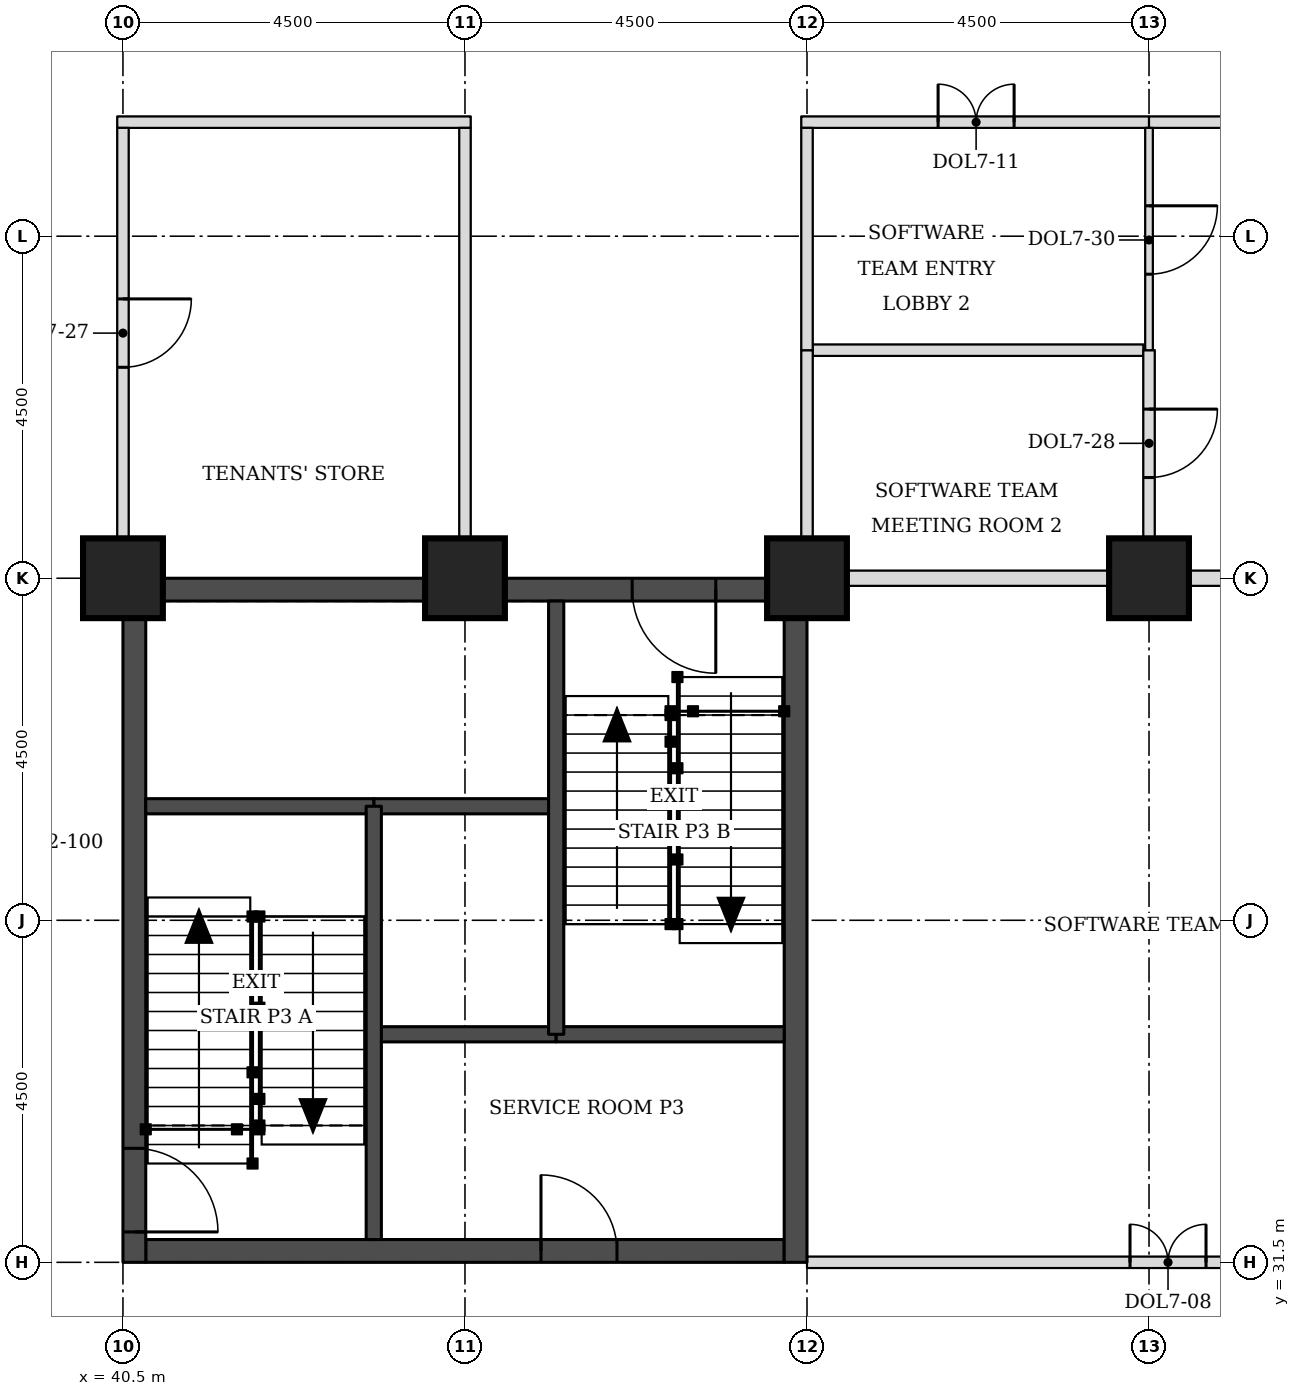
"""IFC4 building model, lengths in metres.
Left out: names, types, materials, properties, quantities, classifications, styles, units other than length and angle.
Written with IfcOpenShell. Run it as: python <this file> out.ifc"""

import sys

from ifc_helpers import new_model, si_unit, direction, frame, frame_2d, origin, origin_2d, place, context, subcontext, project, spatial, rectangle, extrude, element, fill, save


model = new_model("IFC4")
c1 = context("Model", 3, precision=1e-05, world=origin(), true_north=direction((0.0, 1.0)))
c2 = subcontext(c1, "Body", "Model", "MODEL_VIEW")
j1 = project(units=[si_unit("LENGTHUNIT", "METRE"), si_unit("PLANEANGLEUNIT", "RADIAN")], contexts=[c1])
p1 = place(None, origin())
s1 = spatial("IfcSite", under=j1, at=p1, CompositionType="ELEMENT")
p2 = place(p1, origin())
s2 = spatial("IfcBuilding", under=s1, at=p2, CompositionType="ELEMENT")
p3 = place(p2, frame((0.0, 0.0, 134.4)))
s3 = spatial("IfcBuildingStorey", under=s2, at=p3, CompositionType="ELEMENT", Elevation=134.4)
for number, where, z_axis, x_axis in (
    (1, (40.5, 40.5, 0.0), (0.0, 0.0, 1.0), (1.0, 0.0, 0.0)),
    (2, (45.0, 40.5, 0.0), (0.0, 0.0, 1.0), (1.0, 0.0, 0.0)),
    (3, (49.5, 40.5, 0.0), (0.0, 0.0, 1.0), (1.0, 0.0, 0.0)),
    (4, (54.0, 40.5, 0.0), (0.0, 0.0, 1.0), (1.0, 0.0, 0.0)),
):
    element("IfcColumn", number, at=place(p3, frame(where, z_axis=z_axis, x_axis=x_axis)), inside=s3, PredefinedType="COLUMN", context=c2, shape_type="SweptSolid", body=[
        extrude(rectangle(XDim=1.05, YDim=1.05, at=origin_2d()), origin(), (0.0, 0.0, 1.0), 3.7),
    ])
p4 = place(p3, frame((40.8, 31.65, 0.0), z_axis=(0.0, 0.0, 1.0), x_axis=(1.0, 0.0, 0.0)))
e5 = element("IfcWall", 5, at=p4, inside=s3, PredefinedType="SHEAR", context=c2, shape_type="SweptSolid", body=[
    extrude(rectangle(XDim=8.4, YDim=0.3, at=frame_2d((4.2, 0.0))), origin(), (0.0, 0.0, 1.0), 3.7),
])
p5 = place(p4, frame((5.2, 0.0, 0.0)))
e6 = element("IfcOpeningElement", 6, at=p5, cuts=e5, PredefinedType="OPENING", context=c2, shape_type="SweptSolid", body=[
    extrude(rectangle(XDim=1.0, YDim=2.1, at=frame_2d((0.5, 1.05))), frame((0.0, 0.16, 0.0), z_axis=(0.0, -1.0, 0.0), x_axis=(1.0, 0.0, 0.0)), (0.0, 0.0, 1.0), 0.32),
])
p6 = place(p3, frame((40.8, 40.35, 0.0), z_axis=(0.0, 0.0, 1.0), x_axis=(1.0, 0.0, 0.0)))
e7 = element("IfcWall", 7, at=p6, inside=s3, PredefinedType="SHEAR", context=c2, shape_type="SweptSolid", body=[
    extrude(rectangle(XDim=8.4, YDim=0.3, at=frame_2d((4.2, 0.0))), origin(), (0.0, 0.0, 1.0), 3.7),
])
p7 = place(p6, frame((6.4, 0.0, 0.0)))
e8 = element("IfcOpeningElement", 8, at=p7, cuts=e7, PredefinedType="OPENING", context=c2, shape_type="SweptSolid", body=[
    extrude(rectangle(XDim=1.1, YDim=2.1, at=frame_2d((0.55, 1.05))), frame((0.0, 0.16, 0.0), z_axis=(0.0, -1.0, 0.0), x_axis=(1.0, 0.0, 0.0)), (0.0, 0.0, 1.0), 0.32),
])
p8 = place(p3, frame((40.65, 31.5, 0.0), z_axis=(0.0, 0.0, 1.0), x_axis=(0.0, 1.0, 0.0)))
e9 = element("IfcWall", 9, at=p8, inside=s3, PredefinedType="SHEAR", context=c2, shape_type="SweptSolid", body=[
    extrude(rectangle(XDim=9.0, YDim=0.3, at=frame_2d((4.5, 0.0))), origin(), (0.0, 0.0, 1.0), 3.7),
])
p9 = place(p8, frame((0.4, 0.0, 0.0)))
e10 = element("IfcOpeningElement", 10, at=p9, cuts=e9, PredefinedType="OPENING", context=c2, shape_type="SweptSolid", body=[
    extrude(rectangle(XDim=1.1, YDim=2.1, at=frame_2d((0.55, 1.05))), frame((0.0, 0.16, 0.0), z_axis=(0.0, -1.0, 0.0), x_axis=(1.0, 0.0, 0.0)), (0.0, 0.0, 1.0), 0.32),
])
p10 = place(p3, frame((49.35, 31.5, 0.0), z_axis=(0.0, 0.0, 1.0), x_axis=(0.0, 1.0, 0.0)))
e11 = element("IfcWall", 11, at=p10, inside=s3, PredefinedType="SHEAR", context=c2, shape_type="SweptSolid", body=[
    extrude(rectangle(XDim=9.0, YDim=0.3, at=frame_2d((4.5, 0.0))), origin(), (0.0, 0.0, 1.0), 3.7),
])
p11 = place(p3, frame((49.5, 31.5, 0.0), z_axis=(0.0, 0.0, 1.0), x_axis=(1.0, 0.0, 0.0)))
e12 = element("IfcWall", 12, at=p11, inside=s3, PredefinedType="PARTITIONING", context=c2, shape_type="SweptSolid", body=[
    extrude(rectangle(XDim=9.525, YDim=0.15, at=frame_2d((4.762, 0.0))), origin(), (0.0, 0.0, 1.0), 2.55),
])
p12 = place(p11, frame((4.25, 0.0, 0.0)))
e13 = element("IfcOpeningElement", 13, at=p12, cuts=e12, PredefinedType="OPENING", context=c2, shape_type="SweptSolid", body=[
    extrude(rectangle(XDim=1.0, YDim=2.1, at=frame_2d((0.5, 1.05))), frame((0.0, 0.085, 0.0), z_axis=(0.0, -1.0, 0.0), x_axis=(1.0, 0.0, 0.0)), (0.0, 0.0, 1.0), 0.17),
])
p13 = place(p3, frame((50.015, 40.5, 0.0), z_axis=(0.0, 0.0, 1.0), x_axis=(1.0, 0.0, 0.0)))
e14 = element("IfcWall", 14, at=p13, inside=s3, PredefinedType="PARTITIONING", context=c2, shape_type="SweptSolid", body=[
    extrude(rectangle(XDim=3.46, YDim=0.2, at=frame_2d((1.73, 0.0))), origin(), (0.0, 0.0, 1.0), 2.8),
])
p14 = place(p3, frame((54.495, 40.5, 0.0), z_axis=(0.0, 0.0, 1.0), x_axis=(1.0, 0.0, 0.0)))
e15 = element("IfcWall", 15, at=p14, inside=s3, PredefinedType="PARTITIONING", context=c2, shape_type="SweptSolid", body=[
    extrude(rectangle(XDim=3.48, YDim=0.2, at=frame_2d((1.74, 0.0))), origin(), (0.0, 0.0, 1.0), 2.8),
])
p15 = place(p3, frame((49.575, 43.5, 0.0), z_axis=(0.0, 0.0, 1.0), x_axis=(1.0, 0.0, 0.0)))
e16 = element("IfcWall", 16, at=p15, inside=s3, PredefinedType="PARTITIONING", context=c2, shape_type="SweptSolid", body=[
    extrude(rectangle(XDim=4.35, YDim=0.15, at=frame_2d((2.175, 0.0))), origin(), (0.0, 0.0, 1.0), 3.55),
])
p16 = place(p3, frame((40.425, 46.5, 0.0), z_axis=(0.0, 0.0, 1.0), x_axis=(1.0, 0.0, 0.0)))
e17 = element("IfcWall", 17, at=p16, inside=s3, PredefinedType="PARTITIONING", context=c2, shape_type="SweptSolid", body=[
    extrude(rectangle(XDim=4.65, YDim=0.15, at=frame_2d((2.325, 0.0))), origin(), (0.0, 0.0, 1.0), 3.55),
])
p17 = place(p3, frame((49.425, 46.5, 0.0), z_axis=(0.0, 0.0, 1.0), x_axis=(1.0, 0.0, 0.0)))
e18 = element("IfcWall", 18, at=p17, inside=s3, PredefinedType="PARTITIONING", context=c2, shape_type="SweptSolid", body=[
    extrude(rectangle(XDim=4.575, YDim=0.15, at=frame_2d((2.288, 0.0))), origin(), (0.0, 0.0, 1.0), 3.55),
])
p18 = place(p17, frame((1.8, 0.0, 0.0)))
e19 = element("IfcOpeningElement", 19, at=p18, cuts=e18, PredefinedType="OPENING", context=c2, shape_type="SweptSolid", body=[
    extrude(rectangle(XDim=1.0, YDim=2.1, at=frame_2d((0.5, 1.05))), frame((0.0, 0.085, 0.0), z_axis=(0.0, -1.0, 0.0), x_axis=(1.0, 0.0, 0.0)), (0.0, 0.0, 1.0), 0.17),
])
p19 = place(p3, frame((54.0, 46.5, 0.0), z_axis=(0.0, 0.0, 1.0), x_axis=(1.0, 0.0, 0.0)))
e20 = element("IfcWall", 20, at=p19, inside=s3, PredefinedType="PARTITIONING", context=c2, shape_type="SweptSolid", body=[
    extrude(rectangle(XDim=6.0, YDim=0.15, at=frame_2d((3.0, 0.0))), origin(), (0.0, 0.0, 1.0), 3.55),
])
p20 = place(p3, frame((40.5, 41.025, 0.0), z_axis=(0.0, 0.0, 1.0), x_axis=(0.0, 1.0, 0.0)))
e21 = element("IfcWall", 21, at=p20, inside=s3, PredefinedType="PARTITIONING", context=c2, shape_type="SweptSolid", body=[
    extrude(rectangle(XDim=5.4, YDim=0.15, at=frame_2d((2.7, 0.0))), origin(), (0.0, 0.0, 1.0), 3.55),
])
p21 = place(p20, frame((2.25, 0.0, 0.0)))
e22 = element("IfcOpeningElement", 22, at=p21, cuts=e21, PredefinedType="OPENING", context=c2, shape_type="SweptSolid", body=[
    extrude(rectangle(XDim=0.9, YDim=2.1, at=frame_2d((0.45, 1.05))), frame((0.0, 0.085, 0.0), z_axis=(0.0, -1.0, 0.0), x_axis=(1.0, 0.0, 0.0)), (0.0, 0.0, 1.0), 0.17),
])
p22 = place(p3, frame((45.0, 41.025, 0.0), z_axis=(0.0, 0.0, 1.0), x_axis=(0.0, 1.0, 0.0)))
e23 = element("IfcWall", 23, at=p22, inside=s3, PredefinedType="PARTITIONING", context=c2, shape_type="SweptSolid", body=[
    extrude(rectangle(XDim=5.4, YDim=0.15, at=frame_2d((2.7, 0.0))), origin(), (0.0, 0.0, 1.0), 2.938),
])
p23 = place(p3, frame((49.5, 41.025, 0.0), z_axis=(0.0, 0.0, 1.0), x_axis=(0.0, 1.0, 0.0)))
e24 = element("IfcWall", 24, at=p23, inside=s3, PredefinedType="PARTITIONING", context=c2, shape_type="SweptSolid", body=[
    extrude(rectangle(XDim=2.475, YDim=0.15, at=frame_2d((1.238, 0.0))), origin(), (0.0, 0.0, 1.0), 3.55),
])
p24 = place(p3, frame((54.0, 41.025, 0.0), z_axis=(0.0, 0.0, 1.0), x_axis=(0.0, 1.0, 0.0)))
e25 = element("IfcWall", 25, at=p24, inside=s3, PredefinedType="PARTITIONING", context=c2, shape_type="SweptSolid", body=[
    extrude(rectangle(XDim=2.475, YDim=0.15, at=frame_2d((1.238, 0.0))), origin(), (0.0, 0.0, 1.0), 3.55),
])
p25 = place(p24, frame((0.8, 0.0, 0.0)))
e26 = element("IfcOpeningElement", 26, at=p25, cuts=e25, PredefinedType="OPENING", context=c2, shape_type="SweptSolid", body=[
    extrude(rectangle(XDim=0.9, YDim=2.1, at=frame_2d((0.45, 1.05))), frame((0.0, 0.085, 0.0), z_axis=(0.0, -1.0, 0.0), x_axis=(1.0, 0.0, 0.0)), (0.0, 0.0, 1.0), 0.17),
])
p26 = place(p3, frame((49.5, 43.5, 0.0), z_axis=(0.0, 0.0, 1.0), x_axis=(0.0, 1.0, 0.0)))
e27 = element("IfcWall", 27, at=p26, inside=s3, PredefinedType="PARTITIONING", context=c2, shape_type="SweptSolid", body=[
    extrude(rectangle(XDim=2.925, YDim=0.15, at=frame_2d((1.462, 0.0))), origin(), (0.0, 0.0, 1.0), 3.55),
])
p27 = place(p3, frame((54.0, 43.5, 0.0), z_axis=(0.0, 0.0, 1.0), x_axis=(0.0, 1.0, 0.0)))
e28 = element("IfcWall", 28, at=p27, inside=s3, PredefinedType="PARTITIONING", context=c2, shape_type="SweptSolid", body=[
    extrude(rectangle(XDim=2.925, YDim=0.1, at=frame_2d((1.462, 0.0))), origin(), (0.0, 0.0, 1.0), 3.55),
])
p28 = place(p27, frame((1.0, 0.0, 0.0)))
e29 = element("IfcOpeningElement", 29, at=p28, cuts=e28, PredefinedType="OPENING", context=c2, shape_type="SweptSolid", body=[
    extrude(rectangle(XDim=0.9, YDim=2.1, at=frame_2d((0.45, 1.05))), frame((0.0, 0.06, 0.0), z_axis=(0.0, -1.0, 0.0), x_axis=(1.0, 0.0, 0.0)), (0.0, 0.0, 1.0), 0.12),
])
p29 = place(p3, frame((43.8, 34.5, 0.0), z_axis=(0.0, 0.0, 1.0), x_axis=(1.0, 0.0, 0.0)))
e30 = element("IfcWall", 30, at=p29, inside=s3, PredefinedType="SOLIDWALL", context=c2, shape_type="SweptSolid", body=[
    extrude(rectangle(XDim=2.4, YDim=0.2, at=frame_2d((1.2, 0.0))), origin(), (0.0, 0.0, 1.0), 3.55),
])
p30 = place(p3, frame((46.2, 34.5, 0.0), z_axis=(0.0, 0.0, 1.0), x_axis=(1.0, 0.0, 0.0)))
e31 = element("IfcWall", 31, at=p30, inside=s3, PredefinedType="SOLIDWALL", context=c2, shape_type="SweptSolid", body=[
    extrude(rectangle(XDim=3.0, YDim=0.2, at=frame_2d((1.5, 0.0))), origin(), (0.0, 0.0, 1.0), 3.55),
])
p31 = place(p3, frame((43.8, 37.5, 0.0), z_axis=(0.0, 0.0, 1.0), x_axis=(1.0, 0.0, 0.0)))
e32 = element("IfcWall", 32, at=p31, inside=s3, PredefinedType="SOLIDWALL", context=c2, shape_type="SweptSolid", body=[
    extrude(rectangle(XDim=2.4, YDim=0.2, at=frame_2d((1.2, 0.0))), origin(), (0.0, 0.0, 1.0), 3.7),
])
p32 = place(p3, frame((40.8, 37.5, 0.0), z_axis=(0.0, 0.0, 1.0), x_axis=(1.0, 0.0, 0.0)))
e33 = element("IfcWall", 33, at=p32, inside=s3, PredefinedType="SOLIDWALL", context=c2, shape_type="SweptSolid", body=[
    extrude(rectangle(XDim=3.0, YDim=0.2, at=frame_2d((1.5, 0.0))), origin(), (0.0, 0.0, 1.0), 3.55),
])
for number, where, z_axis, x_axis in (
    (34, (43.8, 31.8, 0.0), (0.0, 0.0, 1.0), (0.0, 1.0, 0.0)),
    (35, (46.2, 34.5, 0.0), (0.0, 0.0, 1.0), (0.0, 1.0, 0.0)),
):
    element("IfcWall", number, at=place(p3, frame(where, z_axis=z_axis, x_axis=x_axis)), inside=s3, PredefinedType="SOLIDWALL", context=c2, shape_type="SweptSolid", body=[
        extrude(rectangle(XDim=5.7, YDim=0.2, at=frame_2d((2.85, 0.0))), origin(), (0.0, 0.0, 1.0), 3.55),
    ])
p33 = place(p21, frame((0.9, 0.0, 0.0), z_axis=(0.0, 0.0, 1.0), x_axis=(-1.0, 0.0, 0.0)))
e36 = element("IfcDoor", 36, at=p33, inside=s3, OperationType="SINGLE_SWING_LEFT", PredefinedType="DOOR", context=c2, shape_type="SweptSolid", body=[
    extrude(rectangle(XDim=0.9, YDim=2.1, at=frame_2d((0.45, 1.05))), frame((0.0, 0.025, 0.0), z_axis=(0.0, -1.0, 0.0), x_axis=(1.0, 0.0, 0.0)), (0.0, 0.0, 1.0), 0.05),
])
fill(e22, e36)
p34 = place(p12, origin())
e37 = element("IfcDoor", 37, at=p34, inside=s3, OperationType="DOUBLE_DOOR_SINGLE_SWING", PredefinedType="DOOR", context=c2, shape_type="SweptSolid", body=[
    extrude(rectangle(XDim=1.0, YDim=2.1, at=frame_2d((0.5, 1.05))), frame((0.0, 0.025, 0.0), z_axis=(0.0, -1.0, 0.0), x_axis=(1.0, 0.0, 0.0)), (0.0, 0.0, 1.0), 0.05),
])
fill(e13, e37)
p35 = place(p18, origin())
e38 = element("IfcDoor", 38, at=p35, inside=s3, OperationType="DOUBLE_DOOR_SINGLE_SWING", PredefinedType="DOOR", context=c2, shape_type="SweptSolid", body=[
    extrude(rectangle(XDim=1.0, YDim=2.1, at=frame_2d((0.5, 1.05))), frame((0.0, 0.025, 0.0), z_axis=(0.0, -1.0, 0.0), x_axis=(1.0, 0.0, 0.0)), (0.0, 0.0, 1.0), 0.05),
])
fill(e19, e38)
p36 = place(p28, frame((0.9, 0.0, 0.0), z_axis=(0.0, 0.0, 1.0), x_axis=(-1.0, 0.0, 0.0)))
e39 = element("IfcDoor", 39, at=p36, inside=s3, OperationType="SINGLE_SWING_LEFT", PredefinedType="DOOR", context=c2, shape_type="SweptSolid", body=[
    extrude(rectangle(XDim=0.9, YDim=2.1, at=frame_2d((0.45, 1.05))), frame((0.0, 0.025, 0.0), z_axis=(0.0, -1.0, 0.0), x_axis=(1.0, 0.0, 0.0)), (0.0, 0.0, 1.0), 0.05),
])
fill(e29, e39)
p37 = place(p25, frame((0.9, 0.0, 0.0), z_axis=(0.0, 0.0, 1.0), x_axis=(-1.0, 0.0, 0.0)))
e40 = element("IfcDoor", 40, at=p37, inside=s3, OperationType="SINGLE_SWING_LEFT", PredefinedType="DOOR", context=c2, shape_type="SweptSolid", body=[
    extrude(rectangle(XDim=0.9, YDim=2.1, at=frame_2d((0.45, 1.05))), frame((0.0, 0.025, 0.0), z_axis=(0.0, -1.0, 0.0), x_axis=(1.0, 0.0, 0.0)), (0.0, 0.0, 1.0), 0.05),
])
fill(e26, e40)
p38 = place(p9, frame((1.1, 0.0, 0.0), z_axis=(0.0, 0.0, 1.0), x_axis=(-1.0, 0.0, 0.0)))
e41 = element("IfcDoor", 41, at=p38, inside=s3, OperationType="SINGLE_SWING_RIGHT", PredefinedType="DOOR", context=c2, shape_type="SweptSolid", body=[
    extrude(rectangle(XDim=1.1, YDim=2.1, at=frame_2d((0.55, 1.05))), frame((0.0, 0.025, 0.0), z_axis=(0.0, -1.0, 0.0), x_axis=(1.0, 0.0, 0.0)), (0.0, 0.0, 1.0), 0.05),
])
fill(e10, e41)
p39 = place(p7, frame((1.1, 0.0, 0.0), z_axis=(0.0, 0.0, 1.0), x_axis=(-1.0, 0.0, 0.0)))
e42 = element("IfcDoor", 42, at=p39, inside=s3, OperationType="SINGLE_SWING_LEFT", PredefinedType="DOOR", context=c2, shape_type="SweptSolid", body=[
    extrude(rectangle(XDim=1.1, YDim=2.1, at=frame_2d((0.55, 1.05))), frame((0.0, 0.025, 0.0), z_axis=(0.0, -1.0, 0.0), x_axis=(1.0, 0.0, 0.0)), (0.0, 0.0, 1.0), 0.05),
])
fill(e8, e42)
p40 = place(p5, origin())
e43 = element("IfcDoor", 43, at=p40, inside=s3, OperationType="SINGLE_SWING_LEFT", PredefinedType="DOOR", context=c2, shape_type="SweptSolid", body=[
    extrude(rectangle(XDim=1.0, YDim=2.1, at=frame_2d((0.5, 1.05))), frame((0.0, 0.025, 0.0), z_axis=(0.0, -1.0, 0.0), x_axis=(1.0, 0.0, 0.0)), (0.0, 0.0, 1.0), 0.05),
])
fill(e6, e43)
save(model, sys.argv[1])
